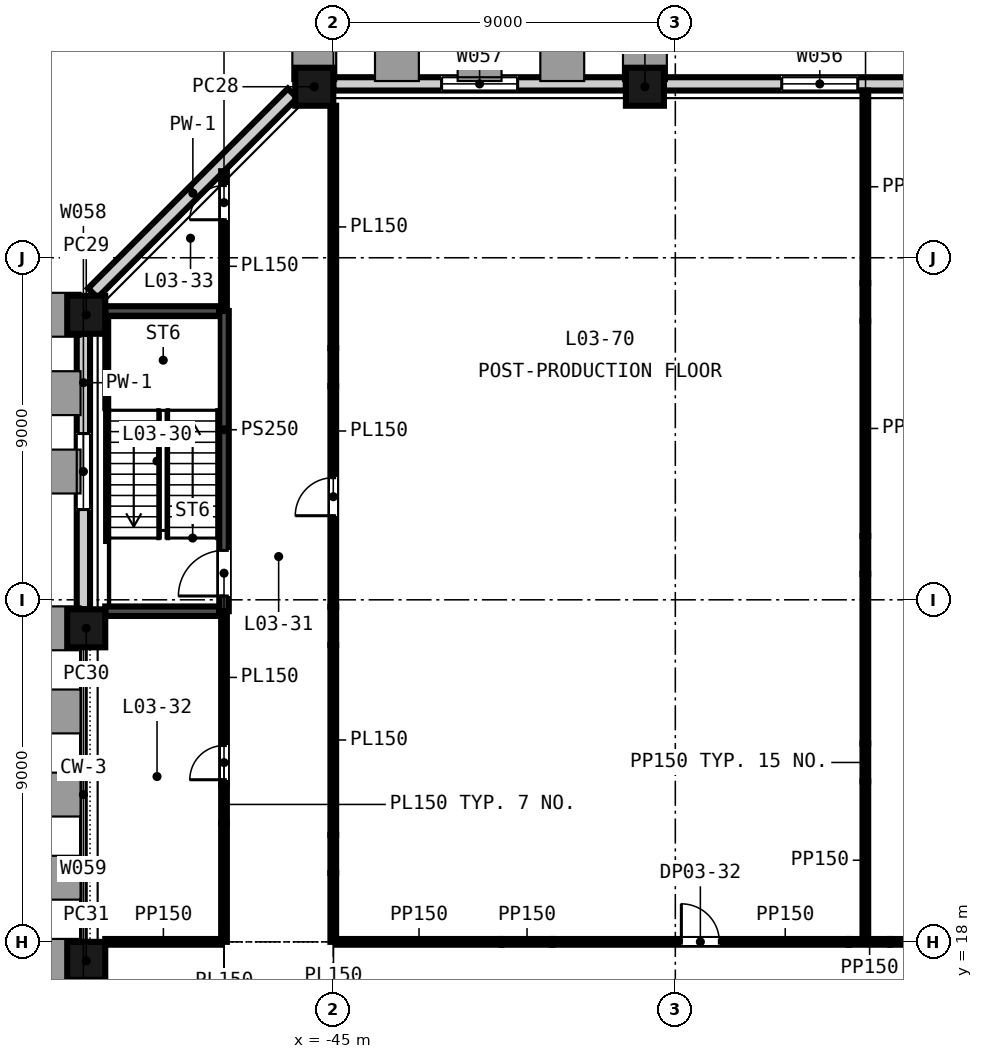
"""IFC4 building model, lengths in metres.
Left out: names, types, materials, properties, quantities, classifications, styles, units other than length and angle.
Written with IfcOpenShell. Run it as: python <this file> out.ifc"""

import sys

from ifc_helpers import new_model, si_unit, direction, frame, frame_2d, origin, origin_2d, place, context, subcontext, project, spatial, rectangle, extrude, element, fill, save


model = new_model("IFC4")
c1 = context("Model", 3, precision=1e-05, world=origin(), true_north=direction((0.0, 1.0)))
c2 = subcontext(c1, "Body", "Model", "MODEL_VIEW")
j1 = project(units=[si_unit("LENGTHUNIT", "METRE"), si_unit("PLANEANGLEUNIT", "RADIAN")], contexts=[c1])
p1 = place(None, origin())
s1 = spatial("IfcSite", under=j1, at=p1, CompositionType="ELEMENT")
p2 = place(p1, origin())
s2 = spatial("IfcBuilding", under=s1, at=p2, CompositionType="ELEMENT")
p3 = place(p2, frame((0.0, 0.0, 22.5)))
s3 = spatial("IfcBuildingStorey", under=s2, at=p3, CompositionType="ELEMENT", Elevation=22.5)
for number, where, z_axis, x_axis in (
    (1, (-36.8, 40.5, -0.3), (0.0, 0.0, 1.0), (-1.0, 0.0, 0.0)),
    (2, (-45.5, 40.5, -0.3), (0.0, 0.0, 1.0), (-1.0, 0.0, 0.0)),
    (3, (-51.5, 34.5, -0.3), (0.0, 0.0, 1.0), (0.0, -1.0, 0.0)),
    (4, (-51.5, 26.25, -0.3), (0.0, 0.0, 1.0), (0.0, -1.0, 0.0)),
    (5, (-51.5, 17.5, -0.3), (0.0, 0.0, 1.0), (0.0, -1.0, 0.0)),
):
    element("IfcColumn", number, at=place(p3, frame(where, z_axis=z_axis, x_axis=x_axis)), inside=s3, PredefinedType="COLUMN", context=c2, shape_type="SweptSolid", body=[
        extrude(rectangle(XDim=1.0, YDim=1.0, at=origin_2d()), origin(), (0.0, 0.0, 1.0), 4.5),
    ])
p4 = place(p3, frame((-28.1, 40.575, -0.3), z_axis=(0.0, 0.0, 1.0), x_axis=(-1.0, 0.0, 0.0)))
e6 = element("IfcWall", 6, at=p4, inside=s3, PredefinedType="SOLIDWALL", context=c2, shape_type="SweptSolid", body=[
    extrude(rectangle(XDim=8.2, YDim=0.35, at=frame_2d((4.1, 0.0))), origin(), (0.0, 0.0, 1.0), 3.6),
])
p5 = place(p4, frame((3.1, 0.0, 1.2)))
e7 = element("IfcOpeningElement", 7, at=p5, cuts=e6, PredefinedType="OPENING", context=c2, shape_type="SweptSolid", body=[
    extrude(rectangle(XDim=2.0, YDim=2.35, at=frame_2d((1.0, 1.175))), frame((0.0, 0.185, 0.0), z_axis=(0.0, -1.0, 0.0), x_axis=(1.0, 0.0, 0.0)), (0.0, 0.0, 1.0), 0.37),
])
p6 = place(p3, frame((-37.3, 40.575, -0.3), z_axis=(0.0, 0.0, 1.0), x_axis=(-1.0, 0.0, 0.0)))
e8 = element("IfcWall", 8, at=p6, inside=s3, PredefinedType="SOLIDWALL", context=c2, shape_type="SweptSolid", body=[
    extrude(rectangle(XDim=7.7, YDim=0.35, at=frame_2d((3.85, 0.0))), origin(), (0.0, 0.0, 1.0), 3.6),
])
p7 = place(p6, frame((2.85, 0.0, 1.2)))
e9 = element("IfcOpeningElement", 9, at=p7, cuts=e8, PredefinedType="OPENING", context=c2, shape_type="SweptSolid", body=[
    extrude(rectangle(XDim=2.0, YDim=2.35, at=frame_2d((1.0, 1.175))), frame((0.0, 0.185, 0.0), z_axis=(0.0, -1.0, 0.0), x_axis=(1.0, 0.0, 0.0)), (0.0, 0.0, 1.0), 0.37),
])
p8 = place(p3, frame((-46.072, 40.327, -0.3), z_axis=(0.0, 0.0, 1.0), x_axis=(-0.707106781187, -0.707106781187, 0.0)))
e10 = element("IfcWall", 10, at=p8, inside=s3, PredefinedType="SOLIDWALL", context=c2, shape_type="SweptSolid", body=[
    extrude(rectangle(XDim=7.433, YDim=0.35, at=frame_2d((3.716, 0.0))), origin(), (0.0, 0.0, 1.0), 3.6),
])
p9 = place(p3, frame((-51.575, 34.0, -0.3), z_axis=(0.0, 0.0, 1.0), x_axis=(0.0, -1.0, 0.0)))
e11 = element("IfcWall", 11, at=p9, inside=s3, PredefinedType="SOLIDWALL", context=c2, shape_type="SweptSolid", body=[
    extrude(rectangle(XDim=7.25, YDim=0.35, at=frame_2d((3.625, 0.0))), origin(), (0.0, 0.0, 1.0), 3.6),
])
p10 = place(p9, frame((2.625, 0.0, 1.2)))
e12 = element("IfcOpeningElement", 12, at=p10, cuts=e11, PredefinedType="OPENING", context=c2, shape_type="SweptSolid", body=[
    extrude(rectangle(XDim=2.0, YDim=2.35, at=frame_2d((1.0, 1.175))), frame((0.0, 0.185, 0.0), z_axis=(0.0, -1.0, 0.0), x_axis=(1.0, 0.0, 0.0)), (0.0, 0.0, 1.0), 0.37),
])
p11 = place(p3, frame((-51.0, 18.0, 0.0), z_axis=(0.0, 0.0, 1.0), x_axis=(1.0, 0.0, 0.0)))
e13 = element("IfcWall", 13, at=p11, inside=s3, PredefinedType="PARTITIONING", context=c2, shape_type="SweptSolid", body=[
    extrude(rectangle(XDim=3.05, YDim=0.15, at=frame_2d((1.525, 0.0))), origin(), (0.0, 0.0, 1.0), 4.2),
])
p12 = place(p3, frame((-44.925, 18.0, 0.0), z_axis=(0.0, 0.0, 1.0), x_axis=(1.0, 0.0, 0.0)))
e14 = element("IfcWall", 14, at=p12, inside=s3, PredefinedType="PARTITIONING", context=c2, shape_type="SweptSolid", body=[
    extrude(rectangle(XDim=4.353, YDim=0.15, at=frame_2d((2.176, 0.0))), origin(), (0.0, 0.0, 1.0), 4.2),
])
p13 = place(p3, frame((-40.572, 18.0, 0.0), z_axis=(0.0, 0.0, 1.0), x_axis=(1.0, 0.0, 0.0)))
e15 = element("IfcWall", 15, at=p13, inside=s3, PredefinedType="PARTITIONING", context=c2, shape_type="SweptSolid", body=[
    extrude(rectangle(XDim=1.331, YDim=0.15, at=frame_2d((0.666, 0.0))), origin(), (0.0, 0.0, 1.0), 3.111),
])
p14 = place(p3, frame((-39.241, 18.0, 0.0), z_axis=(0.0, 0.0, 1.0), x_axis=(1.0, 0.0, 0.0)))
e16 = element("IfcWall", 16, at=p14, inside=s3, PredefinedType="PARTITIONING", context=c2, shape_type="SweptSolid", body=[
    extrude(rectangle(XDim=7.807, YDim=0.15, at=frame_2d((3.903, 0.0))), origin(), (0.0, 0.0, 1.0), 4.2),
])
p15 = place(p14, frame((3.4, 0.0, 0.0)))
e17 = element("IfcOpeningElement", 17, at=p15, cuts=e16, PredefinedType="OPENING", context=c2, shape_type="SweptSolid", body=[
    extrude(rectangle(XDim=1.0, YDim=2.1, at=frame_2d((0.5, 1.05))), frame((0.0, 0.085, 0.0), z_axis=(0.0, -1.0, 0.0), x_axis=(1.0, 0.0, 0.0)), (0.0, 0.0, 1.0), 0.17),
])
p16 = place(p3, frame((-31.434, 18.0, 0.0), z_axis=(0.0, 0.0, 1.0), x_axis=(1.0, 0.0, 0.0)))
e18 = element("IfcWall", 18, at=p16, inside=s3, PredefinedType="PARTITIONING", context=c2, shape_type="SweptSolid", body=[
    extrude(rectangle(XDim=1.083, YDim=0.15, at=frame_2d((0.542, 0.0))), origin(), (0.0, 0.0, 1.0), 3.111),
])
p17 = place(p3, frame((-30.351, 18.0, 0.0), z_axis=(0.0, 0.0, 1.0), x_axis=(1.0, 0.0, 0.0)))
e19 = element("IfcWall", 19, at=p17, inside=s3, PredefinedType="PARTITIONING", context=c2, shape_type="SweptSolid", body=[
    extrude(rectangle(XDim=3.209, YDim=0.15, at=frame_2d((1.604, 0.0))), origin(), (0.0, 0.0, 1.0), 4.2),
])
p18 = place(p17, frame((1.15, 0.0, 0.0)))
e20 = element("IfcOpeningElement", 20, at=p18, cuts=e19, PredefinedType="OPENING", context=c2, shape_type="SweptSolid", body=[
    extrude(rectangle(XDim=1.0, YDim=2.1, at=frame_2d((0.5, 1.05))), frame((0.0, 0.085, 0.0), z_axis=(0.0, -1.0, 0.0), x_axis=(1.0, 0.0, 0.0)), (0.0, 0.0, 1.0), 0.17),
])
for number, where, z_axis, x_axis in (
    (21, (-51.0, 26.7, 0.0), (0.0, 0.0, 1.0), (1.0, 0.0, 0.0)),
    (22, (-51.0, 34.6, 0.0), (0.0, 0.0, 1.0), (1.0, 0.0, 0.0)),
):
    element("IfcWall", number, at=place(p3, frame(where, z_axis=z_axis, x_axis=x_axis)), inside=s3, PredefinedType="SHEAR", context=c2, shape_type="SweptSolid", body=[
        extrude(rectangle(XDim=3.0, YDim=0.25, at=frame_2d((1.5, 0.0))), origin(), (0.0, 0.0, 1.0), 4.2),
    ])
p19 = place(p3, frame((-47.875, 18.0, 0.0), z_axis=(0.0, 0.0, 1.0), x_axis=(0.0, 1.0, 0.0)))
e23 = element("IfcWall", 23, at=p19, inside=s3, PredefinedType="PARTITIONING", context=c2, shape_type="SweptSolid", body=[
    extrude(rectangle(XDim=3.116, YDim=0.15, at=frame_2d((1.558, 0.0))), origin(), (0.0, 0.0, 1.0), 4.2),
])
p20 = place(p3, frame((-47.875, 21.116, 0.0), z_axis=(0.0, 0.0, 1.0), x_axis=(0.0, 1.0, 0.0)))
e24 = element("IfcWall", 24, at=p20, inside=s3, PredefinedType="PARTITIONING", context=c2, shape_type="SweptSolid", body=[
    extrude(rectangle(XDim=1.0, YDim=0.15, at=frame_2d((0.5, 0.0))), origin(), (0.0, 0.0, 1.0), 3.111),
])
p21 = place(p3, frame((-47.875, 22.116, 0.0), z_axis=(0.0, 0.0, 1.0), x_axis=(0.0, 1.0, 0.0)))
e25 = element("IfcWall", 25, at=p21, inside=s3, PredefinedType="PARTITIONING", context=c2, shape_type="SweptSolid", body=[
    extrude(rectangle(XDim=4.584, YDim=0.15, at=frame_2d((2.292, 0.0))), origin(), (0.0, 0.0, 1.0), 4.2),
])
p22 = place(p21, frame((0.15, 0.0, 0.0)))
e26 = element("IfcOpeningElement", 26, at=p22, cuts=e25, PredefinedType="OPENING", context=c2, shape_type="SweptSolid", body=[
    extrude(rectangle(XDim=0.9, YDim=2.1, at=frame_2d((0.45, 1.05))), frame((0.0, 0.085, 0.0), z_axis=(0.0, -1.0, 0.0), x_axis=(1.0, 0.0, 0.0)), (0.0, 0.0, 1.0), 0.17),
])
p23 = place(p3, frame((-47.875, 26.7, 0.0), z_axis=(0.0, 0.0, 1.0), x_axis=(0.0, 1.0, 0.0)))
e27 = element("IfcWall", 27, at=p23, inside=s3, PredefinedType="SHEAR", context=c2, shape_type="SweptSolid", body=[
    extrude(rectangle(XDim=7.9, YDim=0.25, at=frame_2d((3.95, 0.0))), origin(), (0.0, 0.0, 1.0), 4.2),
])
p24 = place(p23, frame((0.4, 0.0, 0.0)))
e28 = element("IfcOpeningElement", 28, at=p24, cuts=e27, PredefinedType="OPENING", context=c2, shape_type="SweptSolid", body=[
    extrude(rectangle(XDim=1.2, YDim=2.1, at=frame_2d((0.6, 1.05))), frame((0.0, 0.135, 0.0), z_axis=(0.0, -1.0, 0.0), x_axis=(1.0, 0.0, 0.0)), (0.0, 0.0, 1.0), 0.27),
])
p25 = place(p3, frame((-47.875, 34.6, 0.0), z_axis=(0.0, 0.0, 1.0), x_axis=(0.0, 1.0, 0.0)))
e29 = element("IfcWall", 29, at=p25, inside=s3, PredefinedType="PARTITIONING", context=c2, shape_type="SweptSolid", body=[
    extrude(rectangle(XDim=3.677, YDim=0.15, at=frame_2d((1.838, 0.0))), origin(), (0.0, 0.0, 1.0), 3.667),
])
p26 = place(p25, frame((2.4, 0.0, 0.0)))
e30 = element("IfcOpeningElement", 30, at=p26, cuts=e29, PredefinedType="OPENING", context=c2, shape_type="SweptSolid", body=[
    extrude(rectangle(XDim=0.9, YDim=2.1, at=frame_2d((0.45, 1.05))), frame((0.0, 0.085, 0.0), z_axis=(0.0, -1.0, 0.0), x_axis=(1.0, 0.0, 0.0)), (0.0, 0.0, 1.0), 0.17),
])
p27 = place(p3, frame((-45.0, 18.0, 0.0), z_axis=(0.0, 0.0, 1.0), x_axis=(0.0, 1.0, 0.0)))
e31 = element("IfcWall", 31, at=p27, inside=s3, PredefinedType="PARTITIONING", context=c2, shape_type="SweptSolid", body=[
    extrude(rectangle(XDim=1.811, YDim=0.15, at=frame_2d((0.906, 0.0))), origin(), (0.0, 0.0, 1.0), 4.2),
])
p28 = place(p3, frame((-45.0, 19.811, 0.0), z_axis=(0.0, 0.0, 1.0), x_axis=(0.0, 1.0, 0.0)))
e32 = element("IfcWall", 32, at=p28, inside=s3, PredefinedType="PARTITIONING", context=c2, shape_type="SweptSolid", body=[
    extrude(rectangle(XDim=1.0, YDim=0.15, at=frame_2d((0.5, 0.0))), origin(), (0.0, 0.0, 1.0), 3.111),
])
p29 = place(p3, frame((-45.0, 20.811, 0.0), z_axis=(0.0, 0.0, 1.0), x_axis=(0.0, 1.0, 0.0)))
e33 = element("IfcWall", 33, at=p29, inside=s3, PredefinedType="PARTITIONING", context=c2, shape_type="SweptSolid", body=[
    extrude(rectangle(XDim=5.002, YDim=0.15, at=frame_2d((2.501, 0.0))), origin(), (0.0, 0.0, 1.0), 4.2),
])
p30 = place(p3, frame((-45.0, 25.813, 0.0), z_axis=(0.0, 0.0, 1.0), x_axis=(0.0, 1.0, 0.0)))
e34 = element("IfcWall", 34, at=p30, inside=s3, PredefinedType="PARTITIONING", context=c2, shape_type="SweptSolid", body=[
    extrude(rectangle(XDim=1.0, YDim=0.15, at=frame_2d((0.5, 0.0))), origin(), (0.0, 0.0, 1.0), 3.111),
])
p31 = place(p3, frame((-45.0, 26.813, 0.0), z_axis=(0.0, 0.0, 1.0), x_axis=(0.0, 1.0, 0.0)))
e35 = element("IfcWall", 35, at=p31, inside=s3, PredefinedType="PARTITIONING", context=c2, shape_type="SweptSolid", body=[
    extrude(rectangle(XDim=5.808, YDim=0.15, at=frame_2d((2.904, 0.0))), origin(), (0.0, 0.0, 1.0), 4.2),
])
p32 = place(p31, frame((2.4, 0.0, 0.0)))
e36 = element("IfcOpeningElement", 36, at=p32, cuts=e35, PredefinedType="OPENING", context=c2, shape_type="SweptSolid", body=[
    extrude(rectangle(XDim=1.0, YDim=2.1, at=frame_2d((0.5, 1.05))), frame((0.0, 0.085, 0.0), z_axis=(0.0, -1.0, 0.0), x_axis=(1.0, 0.0, 0.0)), (0.0, 0.0, 1.0), 0.17),
])
p33 = place(p3, frame((-45.0, 32.621, 0.0), z_axis=(0.0, 0.0, 1.0), x_axis=(0.0, 1.0, 0.0)))
e37 = element("IfcWall", 37, at=p33, inside=s3, PredefinedType="PARTITIONING", context=c2, shape_type="SweptSolid", body=[
    extrude(rectangle(XDim=1.0, YDim=0.15, at=frame_2d((0.5, 0.0))), origin(), (0.0, 0.0, 1.0), 3.111),
])
p34 = place(p3, frame((-45.0, 33.621, 0.0), z_axis=(0.0, 0.0, 1.0), x_axis=(0.0, 1.0, 0.0)))
e38 = element("IfcWall", 38, at=p34, inside=s3, PredefinedType="PARTITIONING", context=c2, shape_type="SweptSolid", body=[
    extrude(rectangle(XDim=6.379, YDim=0.15, at=frame_2d((3.189, 0.0))), origin(), (0.0, 0.0, 1.0), 4.2),
])
p35 = place(p3, frame((-31.0, 18.075, 0.0), z_axis=(0.0, 0.0, 1.0), x_axis=(0.0, 1.0, 0.0)))
e39 = element("IfcWall", 39, at=p35, inside=s3, PredefinedType="PARTITIONING", context=c2, shape_type="SweptSolid", body=[
    extrude(rectangle(XDim=4.145, YDim=0.15, at=frame_2d((2.073, 0.0))), origin(), (0.0, 0.0, 1.0), 4.2),
])
p36 = place(p3, frame((-31.0, 22.22, 0.0), z_axis=(0.0, 0.0, 1.0), x_axis=(0.0, 1.0, 0.0)))
e40 = element("IfcWall", 40, at=p36, inside=s3, PredefinedType="PARTITIONING", context=c2, shape_type="SweptSolid", body=[
    extrude(rectangle(XDim=1.0, YDim=0.15, at=frame_2d((0.5, 0.0))), origin(), (0.0, 0.0, 1.0), 3.111),
])
p37 = place(p3, frame((-31.0, 23.22, 0.0), z_axis=(0.0, 0.0, 1.0), x_axis=(0.0, 1.0, 0.0)))
e41 = element("IfcWall", 41, at=p37, inside=s3, PredefinedType="PARTITIONING", context=c2, shape_type="SweptSolid", body=[
    extrude(rectangle(XDim=4.46, YDim=0.15, at=frame_2d((2.23, 0.0))), origin(), (0.0, 0.0, 1.0), 4.2),
])
p38 = place(p3, frame((-31.0, 27.68, 0.0), z_axis=(0.0, 0.0, 1.0), x_axis=(0.0, 1.0, 0.0)))
e42 = element("IfcWall", 42, at=p38, inside=s3, PredefinedType="PARTITIONING", context=c2, shape_type="SweptSolid", body=[
    extrude(rectangle(XDim=1.0, YDim=0.15, at=frame_2d((0.5, 0.0))), origin(), (0.0, 0.0, 1.0), 3.111),
])
p39 = place(p3, frame((-31.0, 28.68, 0.0), z_axis=(0.0, 0.0, 1.0), x_axis=(0.0, 1.0, 0.0)))
e43 = element("IfcWall", 43, at=p39, inside=s3, PredefinedType="PARTITIONING", context=c2, shape_type="SweptSolid", body=[
    extrude(rectangle(XDim=5.656, YDim=0.15, at=frame_2d((2.828, 0.0))), origin(), (0.0, 0.0, 1.0), 4.2),
])
p40 = place(p3, frame((-31.0, 34.336, 0.0), z_axis=(0.0, 0.0, 1.0), x_axis=(0.0, 1.0, 0.0)))
e44 = element("IfcWall", 44, at=p40, inside=s3, PredefinedType="PARTITIONING", context=c2, shape_type="SweptSolid", body=[
    extrude(rectangle(XDim=1.0, YDim=0.15, at=frame_2d((0.5, 0.0))), origin(), (0.0, 0.0, 1.0), 3.298),
])
p41 = place(p3, frame((-31.0, 35.336, 0.0), z_axis=(0.0, 0.0, 1.0), x_axis=(0.0, 1.0, 0.0)))
e45 = element("IfcWall", 45, at=p41, inside=s3, PredefinedType="PARTITIONING", context=c2, shape_type="SweptSolid", body=[
    extrude(rectangle(XDim=5.064, YDim=0.15, at=frame_2d((2.532, 0.0))), origin(), (0.0, 0.0, 1.0), 4.2),
])
p42 = place(p5, origin())
e46 = element("IfcWindow", 46, at=p42, inside=s3, PartitioningType="SINGLE_PANEL", PredefinedType="WINDOW", context=c2, shape_type="SweptSolid", body=[
    extrude(rectangle(XDim=2.0, YDim=2.35, at=frame_2d((1.0, 1.175))), frame((0.0, 0.03, 0.0), z_axis=(0.0, -1.0, 0.0), x_axis=(1.0, 0.0, 0.0)), (0.0, 0.0, 1.0), 0.06),
])
fill(e7, e46)
p43 = place(p7, origin())
e47 = element("IfcWindow", 47, at=p43, inside=s3, PartitioningType="SINGLE_PANEL", PredefinedType="WINDOW", context=c2, shape_type="SweptSolid", body=[
    extrude(rectangle(XDim=2.0, YDim=2.35, at=frame_2d((1.0, 1.175))), frame((0.0, 0.03, 0.0), z_axis=(0.0, -1.0, 0.0), x_axis=(1.0, 0.0, 0.0)), (0.0, 0.0, 1.0), 0.06),
])
fill(e9, e47)
p44 = place(p10, origin())
e48 = element("IfcWindow", 48, at=p44, inside=s3, PartitioningType="SINGLE_PANEL", PredefinedType="WINDOW", context=c2, shape_type="SweptSolid", body=[
    extrude(rectangle(XDim=2.0, YDim=2.35, at=frame_2d((1.0, 1.175))), frame((0.0, 0.03, 0.0), z_axis=(0.0, -1.0, 0.0), x_axis=(1.0, 0.0, 0.0)), (0.0, 0.0, 1.0), 0.06),
])
fill(e12, e48)
p45 = place(p24, origin())
e49 = element("IfcDoor", 49, at=p45, inside=s3, OperationType="SINGLE_SWING_LEFT", PredefinedType="DOOR", context=c2, shape_type="SweptSolid", body=[
    extrude(rectangle(XDim=1.2, YDim=2.1, at=frame_2d((0.6, 1.05))), frame((0.0, 0.025, 0.0), z_axis=(0.0, -1.0, 0.0), x_axis=(1.0, 0.0, 0.0)), (0.0, 0.0, 1.0), 0.05),
])
fill(e28, e49)
p46 = place(p22, origin())
e50 = element("IfcDoor", 50, at=p46, inside=s3, OperationType="SINGLE_SWING_LEFT", PredefinedType="DOOR", context=c2, shape_type="SweptSolid", body=[
    extrude(rectangle(XDim=0.9, YDim=2.1, at=frame_2d((0.45, 1.05))), frame((0.0, 0.025, 0.0), z_axis=(0.0, -1.0, 0.0), x_axis=(1.0, 0.0, 0.0)), (0.0, 0.0, 1.0), 0.05),
])
fill(e26, e50)
p47 = place(p26, origin())
e51 = element("IfcDoor", 51, at=p47, inside=s3, OperationType="SINGLE_SWING_LEFT", PredefinedType="DOOR", context=c2, shape_type="SweptSolid", body=[
    extrude(rectangle(XDim=0.9, YDim=2.1, at=frame_2d((0.45, 1.05))), frame((0.0, 0.025, 0.0), z_axis=(0.0, -1.0, 0.0), x_axis=(1.0, 0.0, 0.0)), (0.0, 0.0, 1.0), 0.05),
])
fill(e30, e51)
p48 = place(p32, origin())
e52 = element("IfcDoor", 52, at=p48, inside=s3, OperationType="SINGLE_SWING_LEFT", PredefinedType="DOOR", context=c2, shape_type="SweptSolid", body=[
    extrude(rectangle(XDim=1.0, YDim=2.1, at=frame_2d((0.5, 1.05))), frame((0.0, 0.025, 0.0), z_axis=(0.0, -1.0, 0.0), x_axis=(1.0, 0.0, 0.0)), (0.0, 0.0, 1.0), 0.05),
])
fill(e36, e52)
p49 = place(p15, origin())
e53 = element("IfcDoor", 53, at=p49, inside=s3, OperationType="SINGLE_SWING_LEFT", PredefinedType="DOOR", context=c2, shape_type="SweptSolid", body=[
    extrude(rectangle(XDim=1.0, YDim=2.1, at=frame_2d((0.5, 1.05))), frame((0.0, 0.025, 0.0), z_axis=(0.0, -1.0, 0.0), x_axis=(1.0, 0.0, 0.0)), (0.0, 0.0, 1.0), 0.05),
])
fill(e17, e53)
save(model, sys.argv[1])
